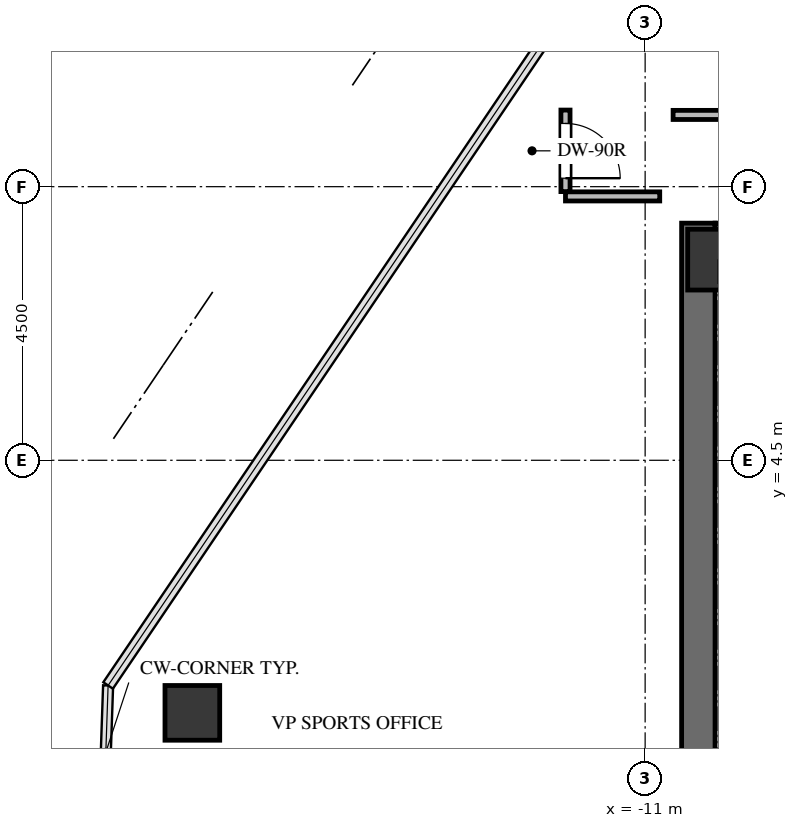
"""IFC4 building model, lengths in metres.
Left out: names, types, materials, properties, quantities, classifications, styles, units other than length and angle.
Written with IfcOpenShell. Run it as: python <this file> out.ifc"""

import sys

from ifc_helpers import new_model, si_unit, direction, frame, frame_2d, origin, origin_2d, place, context, subcontext, project, spatial, rectangle, extrude, source, transform, mapped, element, fill, save


model = new_model("IFC4")
c1 = context("Model", 3, precision=1e-05, world=origin(), true_north=direction((0.0, 1.0)))
c2 = subcontext(c1, "Body", "Model", "MODEL_VIEW")
j1 = project(units=[si_unit("LENGTHUNIT", "METRE"), si_unit("PLANEANGLEUNIT", "RADIAN")], contexts=[c1])
p1 = place(None, origin())
s1 = spatial("IfcSite", under=j1, at=p1, CompositionType="ELEMENT")
p2 = place(p1, origin())
s2 = spatial("IfcBuilding", under=s1, at=p2, CompositionType="ELEMENT")
p3 = place(p2, frame((0.0, 0.0, 231.5)))
s3 = spatial("IfcBuildingStorey", under=s2, at=p3, CompositionType="ELEMENT", Elevation=231.5)
p4 = place(p3, frame((-10.125, -8.4, 0.0), z_axis=(0.0, 0.0, 1.0), x_axis=(0.0, 1.0, 0.0)))
e1 = element("IfcWall", 1, at=p4, inside=s3, PredefinedType="SHEAR", context=c2, shape_type="SweptSolid", body=[
    extrude(rectangle(XDim=16.8, YDim=0.55, at=frame_2d((8.4, 0.0))), origin(), (0.0, 0.0, 1.0), 3.3),
])
p5 = place(p3, frame((-9.85, 8.125, 0.0), z_axis=(0.0, 0.0, 1.0), x_axis=(1.0, 0.0, 0.0)))
e2 = element("IfcWall", 2, at=p5, inside=s3, PredefinedType="SHEAR", context=c2, shape_type="SweptSolid", body=[
    extrude(rectangle(XDim=19.7, YDim=0.55, at=frame_2d((9.85, 0.0))), origin(), (0.0, 0.0, 1.0), 3.3),
])
m1 = source(origin(), c2, "Body", "SweptSolid", [
    extrude(rectangle(XDim=1.0, YDim=1.0, at=origin_2d()), origin(), (0.0, 0.0, 1.0), 3.3),
])
p6 = place(p3, frame((-9.8, 7.8, -0.24), z_axis=(0.0, 0.0, 1.0), x_axis=(1.0, 0.0, 0.0)))
e3 = element("IfcColumn", 3, at=p6, inside=s3, PredefinedType="COLUMN", context=c2, shape_type="MappedRepresentation", body=[
    mapped(m1, transform((0.0, 0.0, 0.0), x_axis=(1.0, 0.0, 0.0), y_axis=(0.0, 1.0, 0.0), z_axis=(0.0, 0.0, 1.0), scale=1.0)),
])
m2 = source(origin(), c2, "Body", "SweptSolid", [
    extrude(rectangle(XDim=0.9, YDim=0.9, at=origin_2d()), origin(), (0.0, 0.0, 1.0), 3.3),
])
p7 = place(p3, frame((-18.446, 0.346, -0.24), z_axis=(0.0, 0.0, 1.0), x_axis=(1.0, 0.0, 0.0)))
e4 = element("IfcColumn", 4, at=p7, inside=s3, PredefinedType="COLUMN", context=c2, shape_type="MappedRepresentation", body=[
    mapped(m2, transform((0.0, 0.0, 0.0), x_axis=(1.0, 0.0, 0.0), y_axis=(0.0, 1.0, 0.0), z_axis=(0.0, 0.0, 1.0), scale=1.0)),
])
p8 = place(p3, frame((-5.96, 10.18, 0.0), z_axis=(0.0, 0.0, 1.0), x_axis=(-1.0, 0.0, 0.0)))
e5 = element("IfcWall", 5, at=p8, inside=s3, PredefinedType="PARTITIONING", context=c2, shape_type="SweptSolid", body=[
    extrude(rectangle(XDim=4.58, YDim=0.15, at=frame_2d((2.29, 0.0))), origin(), (0.0, 0.0, 1.0), 2.301),
])
p9 = place(p8, frame((1.83, 0.0, 0.0)))
e6 = element("IfcOpeningElement", 6, at=p9, cuts=e5, PredefinedType="OPENING", context=c2, shape_type="SweptSolid", body=[
    extrude(rectangle(XDim=0.92, YDim=2.1, at=frame_2d((0.46, 1.05))), frame((0.0, 0.085, 0.0), z_axis=(0.0, -1.0, 0.0), x_axis=(1.0, 0.0, 0.0)), (0.0, 0.0, 1.0), 0.17),
])
p10 = place(p3, frame((-12.31, 8.84, 0.0), z_axis=(0.0, 0.0, 1.0), x_axis=(1.0, 0.0, 0.0)))
e7 = element("IfcWall", 7, at=p10, inside=s3, PredefinedType="PARTITIONING", context=c2, shape_type="SweptSolid", body=[
    extrude(rectangle(XDim=1.55, YDim=0.15, at=frame_2d((0.775, 0.0))), origin(), (0.0, 0.0, 1.0), 3.045),
])
p11 = place(p3, frame((-12.31, 10.26, 0.0), z_axis=(0.0, 0.0, 1.0), x_axis=(0.0, -1.0, 0.0)))
e8 = element("IfcWall", 8, at=p11, inside=s3, PredefinedType="PARTITIONING", context=c2, shape_type="SweptSolid", body=[
    extrude(rectangle(XDim=1.341, YDim=0.15, at=frame_2d((0.67, 0.0))), origin(), (0.0, 0.0, 1.0), 2.399),
])
p12 = place(p11, frame((0.22, 0.0, 0.0)))
e9 = element("IfcOpeningElement", 9, at=p12, cuts=e8, PredefinedType="OPENING", context=c2, shape_type="SweptSolid", body=[
    extrude(rectangle(XDim=0.9, YDim=2.05, at=frame_2d((0.45, 1.025))), frame((0.0, 0.085, 0.0), z_axis=(0.0, -1.0, 0.0), x_axis=(1.0, 0.0, 0.0)), (0.0, 0.0, 1.0), 0.17),
])
m3 = source(origin(), c2, "Body", "SweptSolid", [
    extrude(rectangle(XDim=0.9, YDim=2.05, at=frame_2d((0.45, 1.025))), frame((0.0, 0.025, 0.0), z_axis=(0.0, -1.0, 0.0), x_axis=(1.0, 0.0, 0.0)), (0.0, 0.0, 1.0), 0.05),
])
p13 = place(p12, origin())
e10 = element("IfcDoor", 10, at=p13, inside=s3, OperationType="SINGLE_SWING_RIGHT", PredefinedType="DOOR", context=c2, shape_type="MappedRepresentation", body=[
    mapped(m3, transform((0.0, 0.0, 0.0), x_axis=(1.0, 0.0, 0.0), y_axis=(0.0, 1.0, 0.0), z_axis=(0.0, 0.0, 1.0), scale=1.0)),
])
fill(e9, e10)
save(model, sys.argv[1])
